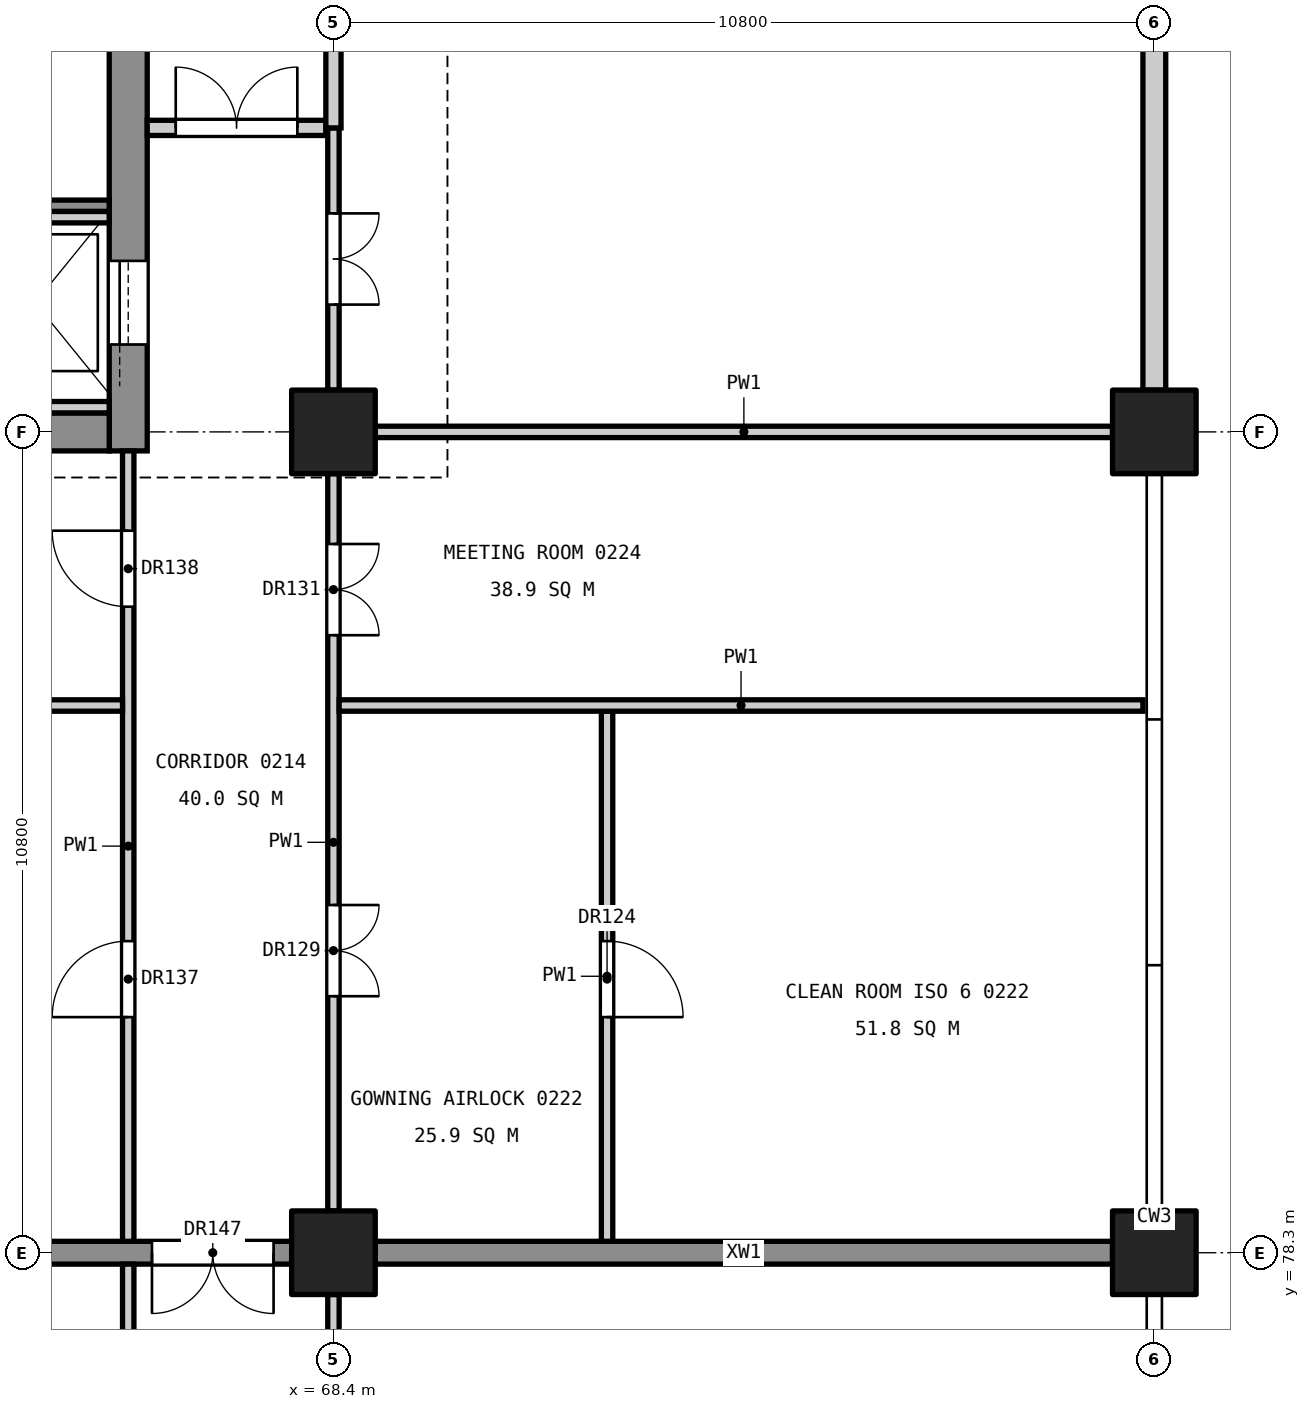
"""IFC4 building model, lengths in metres.
Left out: names, types, materials, properties, quantities, classifications, styles, units other than length and angle.
Written with IfcOpenShell. Run it as: python <this file> out.ifc"""

import sys

from ifc_helpers import new_model, si_unit, direction, frame, frame_2d, origin, origin_2d, place, context, subcontext, project, spatial, rectangle, extrude, element, fill, save


model = new_model("IFC4")
c1 = context("Model", 3, precision=1e-05, world=origin(), true_north=direction((0.0, 1.0)))
c2 = subcontext(c1, "Body", "Model", "MODEL_VIEW")
j1 = project(units=[si_unit("LENGTHUNIT", "METRE"), si_unit("PLANEANGLEUNIT", "RADIAN")], contexts=[c1])
p1 = place(None, origin())
s1 = spatial("IfcSite", under=j1, at=p1, CompositionType="ELEMENT")
p2 = place(p1, origin())
s2 = spatial("IfcBuilding", under=s1, at=p2, CompositionType="ELEMENT")
p3 = place(p2, frame((0.0, 0.0, 11.4)))
s3 = spatial("IfcBuildingStorey", under=s2, at=p3, CompositionType="ELEMENT", Elevation=11.4)
for number, where, z_axis, x_axis in (
    (1, (68.4, 78.3, 0.0), (0.0, 0.0, 1.0), (1.0, 0.0, 0.0)),
    (2, (68.4, 89.1, 0.0), (0.0, 0.0, 1.0), (1.0, 0.0, 0.0)),
    (3, (79.2, 78.3, 0.0), (0.0, 0.0, 1.0), (1.0, 0.0, 0.0)),
    (4, (79.2, 89.1, 0.0), (0.0, 0.0, 1.0), (1.0, 0.0, 0.0)),
):
    element("IfcColumn", number, at=place(p3, frame(where, z_axis=z_axis, x_axis=x_axis)), inside=s3, PredefinedType="COLUMN", context=c2, shape_type="SweptSolid", body=[
        extrude(rectangle(XDim=1.1, YDim=1.1, at=origin_2d()), origin(), (0.0, 0.0, 1.0), 5.4),
    ])
p4 = place(p3, frame((65.7, 88.85, 0.0), z_axis=(0.0, 0.0, 1.0), x_axis=(0.0, 1.0, 0.0)))
e5 = element("IfcWall", 5, at=p4, inside=s3, PredefinedType="SHEAR", context=c2, shape_type="SweptSolid", body=[
    extrude(rectangle(XDim=11.3, YDim=0.5, at=frame_2d((5.65, 0.0))), origin(), (0.0, 0.0, 1.0), 5.1),
])
p5 = place(p4, frame((9.35, 0.0, 0.0)))
e6 = element("IfcOpeningElement", 6, at=p5, cuts=e5, PredefinedType="OPENING", context=c2, shape_type="SweptSolid", body=[
    extrude(rectangle(XDim=1.4, YDim=2.1, at=frame_2d((0.7, 1.05))), frame((0.0, 0.26, 0.0), z_axis=(0.0, -1.0, 0.0), x_axis=(1.0, 0.0, 0.0)), (0.0, 0.0, 1.0), 0.52),
])
p6 = place(p4, frame((1.4, 0.0, 0.0)))
e7 = element("IfcOpeningElement", 7, at=p6, cuts=e5, PredefinedType="OPENING", context=c2, shape_type="SweptSolid", body=[
    extrude(rectangle(XDim=1.1, YDim=2.1, at=frame_2d((0.55, 1.05))), frame((0.0, 0.26, 0.0), z_axis=(0.0, -1.0, 0.0), x_axis=(1.0, 0.0, 0.0)), (0.0, 0.0, 1.0), 0.52),
])
p7 = place(p3, frame((61.45, 89.1, 0.0), z_axis=(0.0, 0.0, 1.0), x_axis=(1.0, 0.0, 0.0)))
e8 = element("IfcWall", 8, at=p7, inside=s3, PredefinedType="SHEAR", context=c2, shape_type="SweptSolid", body=[
    extrude(rectangle(XDim=4.0, YDim=0.5, at=frame_2d((2.0, 0.0))), origin(), (0.0, 0.0, 1.0), 5.1),
])
p8 = place(p3, frame((61.75, 78.3, 0.0), z_axis=(0.0, 0.0, 1.0), x_axis=(1.0, 0.0, 0.0)))
e9 = element("IfcWall", 9, at=p8, inside=s3, PredefinedType="SHEAR", context=c2, shape_type="SweptSolid", body=[
    extrude(rectangle(XDim=6.1, YDim=0.3, at=frame_2d((3.05, 0.0))), origin(), (0.0, 0.0, 1.0), 5.1),
])
p9 = place(p8, frame((4.262, 0.0, 0.0)))
e10 = element("IfcOpeningElement", 10, at=p9, cuts=e9, PredefinedType="OPENING", context=c2, shape_type="SweptSolid", body=[
    extrude(rectangle(XDim=1.6, YDim=2.1, at=frame_2d((0.8, 1.05))), frame((0.0, 0.16, 0.0), z_axis=(0.0, -1.0, 0.0), x_axis=(1.0, 0.0, 0.0)), (0.0, 0.0, 1.0), 0.32),
])
p10 = place(p3, frame((68.95, 78.3, 0.0), z_axis=(0.0, 0.0, 1.0), x_axis=(1.0, 0.0, 0.0)))
e11 = element("IfcWall", 11, at=p10, inside=s3, PredefinedType="SHEAR", context=c2, shape_type="SweptSolid", body=[
    extrude(rectangle(XDim=9.7, YDim=0.3, at=frame_2d((4.85, 0.0))), origin(), (0.0, 0.0, 1.0), 5.1),
])
p11 = place(p3, frame((61.45, 92.075, 0.0), z_axis=(0.0, 0.0, 1.0), x_axis=(1.0, 0.0, 0.0)))
e12 = element("IfcWall", 12, at=p11, inside=s3, PredefinedType="SOLIDWALL", context=c2, shape_type="SweptSolid", body=[
    extrude(rectangle(XDim=4.0, YDim=0.15, at=frame_2d((2.0, 0.0))), origin(), (0.0, 0.0, 1.0), 5.1),
])
for number, where, z_axis, x_axis in (
    (13, (63.65, 91.925, 0.0), (0.0, 0.0, 1.0), (1.0, 0.0, 0.0)),
    (14, (63.65, 89.425, 0.0), (0.0, 0.0, 1.0), (1.0, 0.0, 0.0)),
):
    element("IfcWall", number, at=place(p3, frame(where, z_axis=z_axis, x_axis=x_axis)), inside=s3, PredefinedType="SOLIDWALL", context=c2, shape_type="SweptSolid", body=[
        extrude(rectangle(XDim=1.8, YDim=0.15, at=frame_2d((0.9, 0.0))), origin(), (0.0, 0.0, 1.0), 5.4),
    ])
p12 = place(p3, frame((79.2, 89.65, 0.0), z_axis=(0.0, 0.0, 1.0), x_axis=(0.0, 1.0, 0.0)))
e15 = element("IfcWall", 15, at=p12, inside=s3, PredefinedType="STANDARD", context=c2, shape_type="SweptSolid", body=[
    extrude(rectangle(XDim=9.7, YDim=0.3, at=frame_2d((4.85, 0.0))), origin(), (0.0, 0.0, 1.0), 4.0),
])
p13 = place(p3, frame((65.7, 74.95, 0.0), z_axis=(0.0, 0.0, 1.0), x_axis=(0.0, 1.0, 0.0)))
e16 = element("IfcWall", 16, at=p13, inside=s3, PredefinedType="PARTITIONING", context=c2, shape_type="SweptSolid", body=[
    extrude(rectangle(XDim=3.2, YDim=0.15, at=frame_2d((1.6, 0.0))), origin(), (0.0, 0.0, 1.0), 4.0),
])
p14 = place(p13, frame((1.05, 0.0, 0.0)))
e17 = element("IfcOpeningElement", 17, at=p14, cuts=e16, PredefinedType="OPENING", context=c2, shape_type="SweptSolid", body=[
    extrude(rectangle(XDim=1.0, YDim=2.1, at=frame_2d((0.5, 1.05))), frame((0.0, 0.085, 0.0), z_axis=(0.0, -1.0, 0.0), x_axis=(1.0, 0.0, 0.0)), (0.0, 0.0, 1.0), 0.17),
])
p15 = place(p3, frame((65.7, 78.45, 0.0), z_axis=(0.0, 0.0, 1.0), x_axis=(0.0, 1.0, 0.0)))
e18 = element("IfcWall", 18, at=p15, inside=s3, PredefinedType="PARTITIONING", context=c2, shape_type="SweptSolid", body=[
    extrude(rectangle(XDim=10.4, YDim=0.15, at=frame_2d((5.2, 0.0))), origin(), (0.0, 0.0, 1.0), 4.0),
])
p16 = place(p15, frame((2.95, 0.0, 0.0)))
e19 = element("IfcOpeningElement", 19, at=p16, cuts=e18, PredefinedType="OPENING", context=c2, shape_type="SweptSolid", body=[
    extrude(rectangle(XDim=1.0, YDim=2.1, at=frame_2d((0.5, 1.05))), frame((0.0, 0.085, 0.0), z_axis=(0.0, -1.0, 0.0), x_axis=(1.0, 0.0, 0.0)), (0.0, 0.0, 1.0), 0.17),
])
p17 = place(p15, frame((8.35, 0.0, 0.0)))
e20 = element("IfcOpeningElement", 20, at=p17, cuts=e18, PredefinedType="OPENING", context=c2, shape_type="SweptSolid", body=[
    extrude(rectangle(XDim=1.0, YDim=2.1, at=frame_2d((0.5, 1.05))), frame((0.0, 0.085, 0.0), z_axis=(0.0, -1.0, 0.0), x_axis=(1.0, 0.0, 0.0)), (0.0, 0.0, 1.0), 0.17),
])
p18 = place(p3, frame((61.35, 85.5, 0.0), z_axis=(0.0, 0.0, 1.0), x_axis=(1.0, 0.0, 0.0)))
e21 = element("IfcWall", 21, at=p18, inside=s3, PredefinedType="PARTITIONING", context=c2, shape_type="SweptSolid", body=[
    extrude(rectangle(XDim=4.275, YDim=0.15, at=frame_2d((2.137, 0.0))), origin(), (0.0, 0.0, 1.0), 4.3),
])
p19 = place(p3, frame((65.95, 93.1, 0.0), z_axis=(0.0, 0.0, 1.0), x_axis=(1.0, 0.0, 0.0)))
e22 = element("IfcWall", 22, at=p19, inside=s3, PredefinedType="PARTITIONING", context=c2, shape_type="SweptSolid", body=[
    extrude(rectangle(XDim=2.35, YDim=0.2, at=frame_2d((1.175, 0.0))), origin(), (0.0, 0.0, 1.0), 4.0),
])
p20 = place(p19, frame((0.375, 0.0, 0.0)))
e23 = element("IfcOpeningElement", 23, at=p20, cuts=e22, PredefinedType="OPENING", context=c2, shape_type="SweptSolid", body=[
    extrude(rectangle(XDim=1.6, YDim=2.1, at=frame_2d((0.8, 1.05))), frame((0.0, 0.11, 0.0), z_axis=(0.0, -1.0, 0.0), x_axis=(1.0, 0.0, 0.0)), (0.0, 0.0, 1.0), 0.22),
])
p21 = place(p3, frame((68.4, 70.8, 0.0), z_axis=(0.0, 0.0, 1.0), x_axis=(0.0, 1.0, 0.0)))
e24 = element("IfcWall", 24, at=p21, inside=s3, PredefinedType="PARTITIONING", context=c2, shape_type="SweptSolid", body=[
    extrude(rectangle(XDim=6.95, YDim=0.15, at=frame_2d((3.475, 0.0))), origin(), (0.0, 0.0, 1.0), 4.0),
])
p22 = place(p21, frame((2.875, 0.0, 0.0)))
e25 = element("IfcOpeningElement", 25, at=p22, cuts=e24, PredefinedType="OPENING", context=c2, shape_type="SweptSolid", body=[
    extrude(rectangle(XDim=1.2, YDim=2.1, at=frame_2d((0.6, 1.05))), frame((0.0, 0.085, 0.0), z_axis=(0.0, -1.0, 0.0), x_axis=(1.0, 0.0, 0.0)), (0.0, 0.0, 1.0), 0.17),
])
p23 = place(p3, frame((68.4, 78.85, 0.0), z_axis=(0.0, 0.0, 1.0), x_axis=(0.0, 1.0, 0.0)))
e26 = element("IfcWall", 26, at=p23, inside=s3, PredefinedType="PARTITIONING", context=c2, shape_type="SweptSolid", body=[
    extrude(rectangle(XDim=9.7, YDim=0.15, at=frame_2d((4.85, 0.0))), origin(), (0.0, 0.0, 1.0), 4.0),
])
p24 = place(p23, frame((2.825, 0.0, 0.0)))
e27 = element("IfcOpeningElement", 27, at=p24, cuts=e26, PredefinedType="OPENING", context=c2, shape_type="SweptSolid", body=[
    extrude(rectangle(XDim=1.2, YDim=2.1, at=frame_2d((0.6, 1.05))), frame((0.0, 0.085, 0.0), z_axis=(0.0, -1.0, 0.0), x_axis=(1.0, 0.0, 0.0)), (0.0, 0.0, 1.0), 0.17),
])
p25 = place(p23, frame((7.575, 0.0, 0.0)))
e28 = element("IfcOpeningElement", 28, at=p25, cuts=e26, PredefinedType="OPENING", context=c2, shape_type="SweptSolid", body=[
    extrude(rectangle(XDim=1.2, YDim=2.1, at=frame_2d((0.6, 1.05))), frame((0.0, 0.085, 0.0), z_axis=(0.0, -1.0, 0.0), x_axis=(1.0, 0.0, 0.0)), (0.0, 0.0, 1.0), 0.17),
])
p26 = place(p3, frame((68.4, 89.65, 0.0), z_axis=(0.0, 0.0, 1.0), x_axis=(0.0, 1.0, 0.0)))
e29 = element("IfcWall", 29, at=p26, inside=s3, PredefinedType="PARTITIONING", context=c2, shape_type="SweptSolid", body=[
    extrude(rectangle(XDim=3.45, YDim=0.15, at=frame_2d((1.725, 0.0))), origin(), (0.0, 0.0, 1.0), 4.0),
])
p27 = place(p26, frame((1.125, 0.0, 0.0)))
e30 = element("IfcOpeningElement", 30, at=p27, cuts=e29, PredefinedType="OPENING", context=c2, shape_type="SweptSolid", body=[
    extrude(rectangle(XDim=1.2, YDim=2.1, at=frame_2d((0.6, 1.05))), frame((0.0, 0.085, 0.0), z_axis=(0.0, -1.0, 0.0), x_axis=(1.0, 0.0, 0.0)), (0.0, 0.0, 1.0), 0.17),
])
p28 = place(p3, frame((68.4, 93.1, 0.0), z_axis=(0.0, 0.0, 1.0), x_axis=(0.0, 1.0, 0.0)))
e31 = element("IfcWall", 31, at=p28, inside=s3, PredefinedType="PARTITIONING", context=c2, shape_type="SweptSolid", body=[
    extrude(rectangle(XDim=6.25, YDim=0.2, at=frame_2d((3.125, 0.0))), origin(), (0.0, 0.0, 1.0), 4.0),
])
p29 = place(p3, frame((72.0, 78.45, 0.0), z_axis=(0.0, 0.0, 1.0), x_axis=(0.0, 1.0, 0.0)))
e32 = element("IfcWall", 32, at=p29, inside=s3, PredefinedType="PARTITIONING", context=c2, shape_type="SweptSolid", body=[
    extrude(rectangle(XDim=6.975, YDim=0.15, at=frame_2d((3.488, 0.0))), origin(), (0.0, 0.0, 1.0), 4.0),
])
p30 = place(p29, frame((2.95, 0.0, 0.0)))
e33 = element("IfcOpeningElement", 33, at=p30, cuts=e32, PredefinedType="OPENING", context=c2, shape_type="SweptSolid", body=[
    extrude(rectangle(XDim=1.0, YDim=2.1, at=frame_2d((0.5, 1.05))), frame((0.0, 0.085, 0.0), z_axis=(0.0, -1.0, 0.0), x_axis=(1.0, 0.0, 0.0)), (0.0, 0.0, 1.0), 0.17),
])
p31 = place(p3, frame((68.475, 85.5, 0.0), z_axis=(0.0, 0.0, 1.0), x_axis=(1.0, 0.0, 0.0)))
e34 = element("IfcWall", 34, at=p31, inside=s3, PredefinedType="PARTITIONING", context=c2, shape_type="SweptSolid", body=[
    extrude(rectangle(XDim=10.575, YDim=0.15, at=frame_2d((5.288, 0.0))), origin(), (0.0, 0.0, 1.0), 4.3),
])
p32 = place(p3, frame((68.95, 89.1, 0.0), z_axis=(0.0, 0.0, 1.0), x_axis=(1.0, 0.0, 0.0)))
e35 = element("IfcWall", 35, at=p32, inside=s3, PredefinedType="PARTITIONING", context=c2, shape_type="SweptSolid", body=[
    extrude(rectangle(XDim=9.7, YDim=0.15, at=frame_2d((4.85, 0.0))), origin(), (0.0, 0.0, 1.0), 4.3),
])
p33 = place(p6, origin())
e36 = element("IfcDoor", 36, at=p33, inside=s3, OperationType="SLIDING_TO_LEFT", PredefinedType="DOOR", context=c2, shape_type="SweptSolid", body=[
    extrude(rectangle(XDim=1.1, YDim=2.1, at=frame_2d((0.55, 1.05))), frame((0.0, 0.025, 0.0), z_axis=(0.0, -1.0, 0.0), x_axis=(1.0, 0.0, 0.0)), (0.0, 0.0, 1.0), 0.05),
])
fill(e7, e36)
p34 = place(p30, frame((1.0, 0.0, 0.0), z_axis=(0.0, 0.0, 1.0), x_axis=(-1.0, 0.0, 0.0)))
e37 = element("IfcDoor", 37, at=p34, inside=s3, OperationType="SINGLE_SWING_RIGHT", PredefinedType="DOOR", context=c2, shape_type="SweptSolid", body=[
    extrude(rectangle(XDim=1.0, YDim=2.1, at=frame_2d((0.5, 1.05))), frame((0.0, 0.025, 0.0), z_axis=(0.0, -1.0, 0.0), x_axis=(1.0, 0.0, 0.0)), (0.0, 0.0, 1.0), 0.05),
])
fill(e33, e37)
p35 = place(p27, frame((1.2, 0.0, 0.0), z_axis=(0.0, 0.0, 1.0), x_axis=(-1.0, 0.0, 0.0)))
e38 = element("IfcDoor", 38, at=p35, inside=s3, OperationType="DOUBLE_DOOR_SINGLE_SWING", PredefinedType="DOOR", context=c2, shape_type="SweptSolid", body=[
    extrude(rectangle(XDim=1.2, YDim=2.1, at=frame_2d((0.6, 1.05))), frame((0.0, 0.025, 0.0), z_axis=(0.0, -1.0, 0.0), x_axis=(1.0, 0.0, 0.0)), (0.0, 0.0, 1.0), 0.05),
])
fill(e30, e38)
p36 = place(p24, frame((1.2, 0.0, 0.0), z_axis=(0.0, 0.0, 1.0), x_axis=(-1.0, 0.0, 0.0)))
e39 = element("IfcDoor", 39, at=p36, inside=s3, OperationType="DOUBLE_DOOR_SINGLE_SWING", PredefinedType="DOOR", context=c2, shape_type="SweptSolid", body=[
    extrude(rectangle(XDim=1.2, YDim=2.1, at=frame_2d((0.6, 1.05))), frame((0.0, 0.025, 0.0), z_axis=(0.0, -1.0, 0.0), x_axis=(1.0, 0.0, 0.0)), (0.0, 0.0, 1.0), 0.05),
])
fill(e27, e39)
p37 = place(p25, frame((1.2, 0.0, 0.0), z_axis=(0.0, 0.0, 1.0), x_axis=(-1.0, 0.0, 0.0)))
e40 = element("IfcDoor", 40, at=p37, inside=s3, OperationType="DOUBLE_DOOR_SINGLE_SWING", PredefinedType="DOOR", context=c2, shape_type="SweptSolid", body=[
    extrude(rectangle(XDim=1.2, YDim=2.1, at=frame_2d((0.6, 1.05))), frame((0.0, 0.025, 0.0), z_axis=(0.0, -1.0, 0.0), x_axis=(1.0, 0.0, 0.0)), (0.0, 0.0, 1.0), 0.05),
])
fill(e28, e40)
p38 = place(p16, origin())
e41 = element("IfcDoor", 41, at=p38, inside=s3, OperationType="SINGLE_SWING_LEFT", PredefinedType="DOOR", context=c2, shape_type="SweptSolid", body=[
    extrude(rectangle(XDim=1.0, YDim=2.1, at=frame_2d((0.5, 1.05))), frame((0.0, 0.025, 0.0), z_axis=(0.0, -1.0, 0.0), x_axis=(1.0, 0.0, 0.0)), (0.0, 0.0, 1.0), 0.05),
])
fill(e19, e41)
p39 = place(p17, origin())
e42 = element("IfcDoor", 42, at=p39, inside=s3, OperationType="SINGLE_SWING_RIGHT", PredefinedType="DOOR", context=c2, shape_type="SweptSolid", body=[
    extrude(rectangle(XDim=1.0, YDim=2.1, at=frame_2d((0.5, 1.05))), frame((0.0, 0.025, 0.0), z_axis=(0.0, -1.0, 0.0), x_axis=(1.0, 0.0, 0.0)), (0.0, 0.0, 1.0), 0.05),
])
fill(e20, e42)
p40 = place(p20, origin())
e43 = element("IfcDoor", 43, at=p40, inside=s3, OperationType="DOUBLE_DOOR_SINGLE_SWING", PredefinedType="DOOR", context=c2, shape_type="SweptSolid", body=[
    extrude(rectangle(XDim=1.6, YDim=2.1, at=frame_2d((0.8, 1.05))), frame((0.0, 0.025, 0.0), z_axis=(0.0, -1.0, 0.0), x_axis=(1.0, 0.0, 0.0)), (0.0, 0.0, 1.0), 0.05),
])
fill(e23, e43)
p41 = place(p9, frame((1.6, 0.0, 0.0), z_axis=(0.0, 0.0, 1.0), x_axis=(-1.0, 0.0, 0.0)))
e44 = element("IfcDoor", 44, at=p41, inside=s3, OperationType="DOUBLE_DOOR_SINGLE_SWING", PredefinedType="DOOR", context=c2, shape_type="SweptSolid", body=[
    extrude(rectangle(XDim=1.6, YDim=2.1, at=frame_2d((0.8, 1.05))), frame((0.0, 0.025, 0.0), z_axis=(0.0, -1.0, 0.0), x_axis=(1.0, 0.0, 0.0)), (0.0, 0.0, 1.0), 0.05),
])
fill(e10, e44)
save(model, sys.argv[1])
